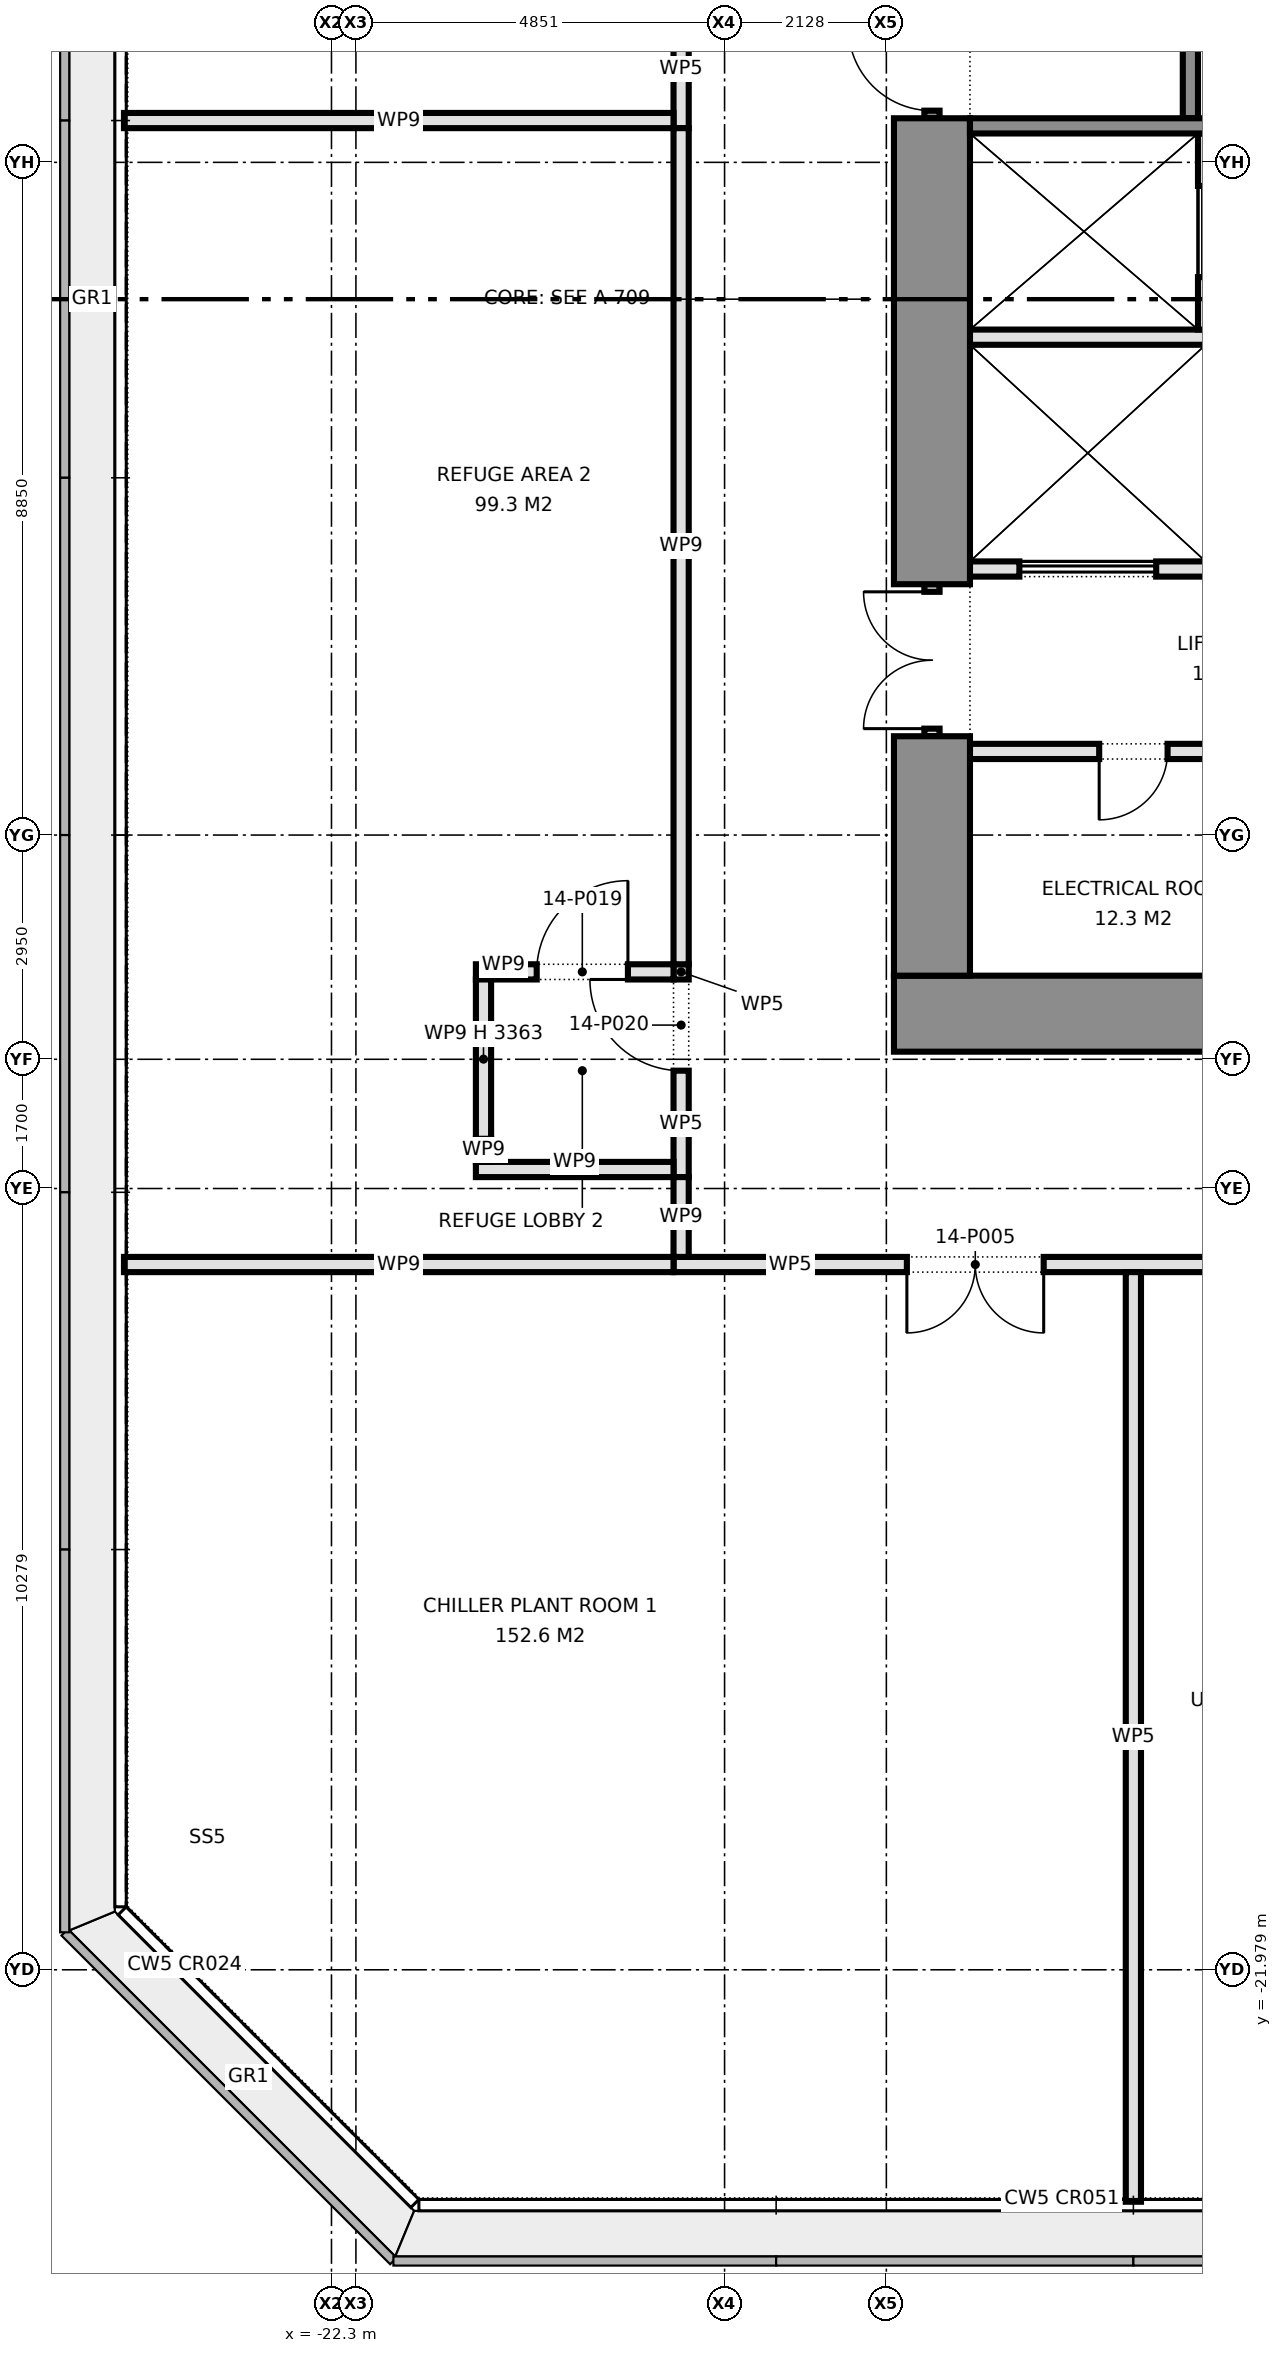
"""IFC4 building model, lengths in metres.
Left out: names, types, materials, properties, quantities, classifications, styles, units other than length and angle.
Written with IfcOpenShell. Run it as: python <this file> out.ifc"""

import sys

from ifc_helpers import new_model, si_unit, direction, frame, frame_2d, origin, place, context, subcontext, project, spatial, rectangle, extrude, element, fill, save


model = new_model("IFC4")
c1 = context("Model", 3, precision=1e-05, world=origin(), true_north=direction((0.0, 1.0)))
c2 = subcontext(c1, "Body", "Model", "MODEL_VIEW")
j1 = project(units=[si_unit("LENGTHUNIT", "METRE"), si_unit("PLANEANGLEUNIT", "RADIAN")], contexts=[c1])
p1 = place(None, origin())
s1 = spatial("IfcSite", under=j1, at=p1, CompositionType="ELEMENT")
p2 = place(p1, origin())
s2 = spatial("IfcBuilding", under=s1, at=p2, CompositionType="ELEMENT")
p3 = place(p2, frame((0.0, 0.0, 64.1)))
s3 = spatial("IfcBuildingStorey", under=s2, at=p3, CompositionType="ELEMENT", Elevation=64.1)
p4 = place(p3, frame((-14.9, -9.4, 0.0), z_axis=(0.0, 0.0, 1.0), x_axis=(1.0, 0.0, 0.0)))
e1 = element("IfcWall", 1, at=p4, inside=s3, PredefinedType="SHEAR", context=c2, shape_type="SweptSolid", body=[
    extrude(rectangle(XDim=10.8, YDim=1.0, at=frame_2d((5.4, 0.0))), origin(), (0.0, 0.0, 1.0), 4.3),
])
p5 = place(p3, frame((-14.4, -8.9, 0.0), z_axis=(0.0, 0.0, 1.0), x_axis=(0.0, 1.0, 0.0)))
e2 = element("IfcWall", 2, at=p5, inside=s3, PredefinedType="SHEAR", context=c2, shape_type="SweptSolid", body=[
    extrude(rectangle(XDim=3.15, YDim=1.0, at=frame_2d((1.575, 0.0))), origin(), (0.0, 0.0, 1.0), 4.3),
])
p6 = place(p3, frame((-14.4, -5.75, 0.0), z_axis=(0.0, 0.0, 1.0), x_axis=(0.0, 1.0, 0.0)))
e3 = element("IfcWall", 3, at=p6, inside=s3, PredefinedType="PARTITIONING", context=c2, shape_type="SweptSolid", body=[
    extrude(rectangle(XDim=2.0, YDim=0.2, at=frame_2d((1.0, 0.0))), origin(), (0.0, 0.0, 1.0), 2.4),
])
p7 = place(p6, frame((0.1, 0.0, 0.0)))
e4 = element("IfcOpeningElement", 4, at=p7, cuts=e3, PredefinedType="OPENING", context=c2, shape_type="SweptSolid", body=[
    extrude(rectangle(XDim=1.8, YDim=2.1, at=frame_2d((0.9, 1.05))), frame((0.0, 0.11, 0.0), z_axis=(0.0, -1.0, 0.0), x_axis=(1.0, 0.0, 0.0)), (0.0, 0.0, 1.0), 0.22),
])
p8 = place(p3, frame((-14.4, -3.75, 0.0), z_axis=(0.0, 0.0, 1.0), x_axis=(0.0, 1.0, 0.0)))
e5 = element("IfcWall", 5, at=p8, inside=s3, PredefinedType="SHEAR", context=c2, shape_type="SweptSolid", body=[
    extrude(rectangle(XDim=6.13, YDim=1.0, at=frame_2d((3.065, 0.0))), origin(), (0.0, 0.0, 1.0), 4.3),
])
p9 = place(p3, frame((-14.4, 2.38, 0.0), z_axis=(0.0, 0.0, 1.0), x_axis=(0.0, 1.0, 0.0)))
e6 = element("IfcWall", 6, at=p9, inside=s3, PredefinedType="SHEAR", context=c2, shape_type="SweptSolid", body=[
    extrude(rectangle(XDim=1.3, YDim=0.2, at=frame_2d((0.65, 0.0))), origin(), (0.0, 0.0, 1.0), 2.4),
])
p10 = place(p9, frame((0.1, 0.0, 0.0)))
e7 = element("IfcOpeningElement", 7, at=p10, cuts=e6, PredefinedType="OPENING", context=c2, shape_type="SweptSolid", body=[
    extrude(rectangle(XDim=1.1, YDim=2.1, at=frame_2d((0.55, 1.05))), frame((0.0, 0.11, 0.0), z_axis=(0.0, -1.0, 0.0), x_axis=(1.0, 0.0, 0.0)), (0.0, 0.0, 1.0), 0.22),
])
p11 = place(p3, frame((-13.9, -5.95, 0.0), z_axis=(0.0, 0.0, 1.0), x_axis=(1.0, 0.0, 0.0)))
e8 = element("IfcWall", 8, at=p11, inside=s3, PredefinedType="PARTITIONING", context=c2, shape_type="SweptSolid", body=[
    extrude(rectangle(XDim=8.8, YDim=0.2, at=frame_2d((4.4, 0.0))), origin(), (0.0, 0.0, 1.0), 4.3),
])
p12 = place(p11, frame((1.7, 0.0, 0.0)))
e9 = element("IfcOpeningElement", 9, at=p12, cuts=e8, PredefinedType="OPENING", context=c2, shape_type="SweptSolid", body=[
    extrude(rectangle(XDim=0.9, YDim=2.1, at=frame_2d((0.45, 1.05))), frame((0.0, 0.11, 0.0), z_axis=(0.0, -1.0, 0.0), x_axis=(1.0, 0.0, 0.0)), (0.0, 0.0, 1.0), 0.22),
])
p13 = place(p3, frame((-13.9, -3.55, 0.0), z_axis=(0.0, 0.0, 1.0), x_axis=(1.0, 0.0, 0.0)))
e10 = element("IfcWall", 10, at=p13, inside=s3, PredefinedType="PARTITIONING", context=c2, shape_type="SweptSolid", body=[
    extrude(rectangle(XDim=8.8, YDim=0.2, at=frame_2d((4.4, 0.0))), origin(), (0.0, 0.0, 1.0), 4.3),
])
p14 = place(p13, frame((0.65, 0.0, 0.0)))
e11 = element("IfcOpeningElement", 11, at=p14, cuts=e10, PredefinedType="OPENING", context=c2, shape_type="SweptSolid", body=[
    extrude(rectangle(XDim=1.8, YDim=2.1, at=frame_2d((0.9, 1.05))), frame((0.0, 0.11, 0.0), z_axis=(0.0, -1.0, 0.0), x_axis=(1.0, 0.0, 0.0)), (0.0, 0.0, 1.0), 0.22),
])
p15 = place(p13, frame((4.0, 0.0, 0.0)))
e12 = element("IfcOpeningElement", 12, at=p15, cuts=e10, PredefinedType="OPENING", context=c2, shape_type="SweptSolid", body=[
    extrude(rectangle(XDim=1.2, YDim=2.1, at=frame_2d((0.6, 1.05))), frame((0.0, 0.11, 0.0), z_axis=(0.0, -1.0, 0.0), x_axis=(1.0, 0.0, 0.0)), (0.0, 0.0, 1.0), 0.22),
])
p16 = place(p13, frame((6.85, 0.0, 0.0)))
e13 = element("IfcOpeningElement", 13, at=p16, cuts=e10, PredefinedType="OPENING", context=c2, shape_type="SweptSolid", body=[
    extrude(rectangle(XDim=1.2, YDim=2.1, at=frame_2d((0.6, 1.05))), frame((0.0, 0.11, 0.0), z_axis=(0.0, -1.0, 0.0), x_axis=(1.0, 0.0, 0.0)), (0.0, 0.0, 1.0), 0.22),
])
p17 = place(p3, frame((-13.9, -0.5, 0.0), z_axis=(0.0, 0.0, 1.0), x_axis=(1.0, 0.0, 0.0)))
e14 = element("IfcWall", 14, at=p17, inside=s3, PredefinedType="PARTITIONING", context=c2, shape_type="SweptSolid", body=[
    extrude(rectangle(XDim=8.8, YDim=0.2, at=frame_2d((4.4, 0.0))), origin(), (0.0, 0.0, 1.0), 4.3),
])
p18 = place(p3, frame((-10.8, -0.4, 0.0), z_axis=(0.0, 0.0, 1.0), x_axis=(0.0, 1.0, 0.0)))
e15 = element("IfcWall", 15, at=p18, inside=s3, PredefinedType="PARTITIONING", context=c2, shape_type="SweptSolid", body=[
    extrude(rectangle(XDim=2.58, YDim=0.2, at=frame_2d((1.29, 0.0))), origin(), (0.0, 0.0, 1.0), 4.3),
])
p19 = place(p18, frame((0.69, 0.0, 0.0)))
e16 = element("IfcOpeningElement", 16, at=p19, cuts=e15, PredefinedType="OPENING", context=c2, shape_type="SweptSolid", body=[
    extrude(rectangle(XDim=1.2, YDim=2.1, at=frame_2d((0.6, 1.05))), frame((0.0, 0.11, 0.0), z_axis=(0.0, -1.0, 0.0), x_axis=(1.0, 0.0, 0.0)), (0.0, 0.0, 1.0), 0.22),
])
p20 = place(p3, frame((-13.9, 2.28, 0.0), z_axis=(0.0, 0.0, 1.0), x_axis=(1.0, 0.0, 0.0)))
e17 = element("IfcWall", 17, at=p20, inside=s3, PredefinedType="SHEAR", context=c2, shape_type="SweptSolid", body=[
    extrude(rectangle(XDim=8.8, YDim=0.2, at=frame_2d((4.4, 0.0))), origin(), (0.0, 0.0, 1.0), 4.3),
])
p21 = place(p20, frame((3.8, 0.0, 0.0)))
e18 = element("IfcOpeningElement", 18, at=p21, cuts=e17, PredefinedType="OPENING", context=c2, shape_type="SweptSolid", body=[
    extrude(rectangle(XDim=1.2, YDim=2.1, at=frame_2d((0.6, 1.05))), frame((0.0, 0.11, 0.0), z_axis=(0.0, -1.0, 0.0), x_axis=(1.0, 0.0, 0.0)), (0.0, 0.0, 1.0), 0.22),
])
p22 = place(p20, frame((6.8, 0.0, 0.0)))
e19 = element("IfcOpeningElement", 19, at=p22, cuts=e17, PredefinedType="OPENING", context=c2, shape_type="SweptSolid", body=[
    extrude(rectangle(XDim=1.2, YDim=2.1, at=frame_2d((0.6, 1.05))), frame((0.0, 0.11, 0.0), z_axis=(0.0, -1.0, 0.0), x_axis=(1.0, 0.0, 0.0)), (0.0, 0.0, 1.0), 0.22),
])
p23 = place(p3, frame((-11.0, 2.38, 0.0), z_axis=(0.0, 0.0, 1.0), x_axis=(0.0, 1.0, 0.0)))
e20 = element("IfcWall", 20, at=p23, inside=s3, PredefinedType="SHEAR", context=c2, shape_type="SweptSolid", body=[
    extrude(rectangle(XDim=6.52, YDim=0.2, at=frame_2d((3.26, 0.0))), origin(), (0.0, 0.0, 1.0), 4.3),
])
p24 = place(p3, frame((-17.8, -12.7, 0.0), z_axis=(0.0, 0.0, 1.0), x_axis=(1.0, 0.0, 0.0)))
e21 = element("IfcWall", 21, at=p24, inside=s3, PredefinedType="PARTITIONING", context=c2, shape_type="SweptSolid", body=[
    extrude(rectangle(XDim=22.85, YDim=0.2, at=frame_2d((11.425, 0.0))), origin(), (0.0, 0.0, 1.0), 4.3),
])
p25 = place(p24, frame((3.07, 0.0, 0.0)))
e22 = element("IfcOpeningElement", 22, at=p25, cuts=e21, PredefinedType="OPENING", context=c2, shape_type="SweptSolid", body=[
    extrude(rectangle(XDim=1.8, YDim=2.1, at=frame_2d((0.9, 1.05))), frame((0.0, 0.11, 0.0), z_axis=(0.0, -1.0, 0.0), x_axis=(1.0, 0.0, 0.0)), (0.0, 0.0, 1.0), 0.22),
])
p26 = place(p24, frame((7.5, 0.0, 0.0)))
e23 = element("IfcOpeningElement", 23, at=p26, cuts=e21, PredefinedType="OPENING", context=c2, shape_type="SweptSolid", body=[
    extrude(rectangle(XDim=1.8, YDim=2.1, at=frame_2d((0.9, 1.05))), frame((0.0, 0.11, 0.0), z_axis=(0.0, -1.0, 0.0), x_axis=(1.0, 0.0, 0.0)), (0.0, 0.0, 1.0), 0.22),
])
p27 = place(p24, frame((14.55, 0.0, 0.0)))
e24 = element("IfcOpeningElement", 24, at=p27, cuts=e21, PredefinedType="OPENING", context=c2, shape_type="SweptSolid", body=[
    extrude(rectangle(XDim=1.8, YDim=2.1, at=frame_2d((0.9, 1.05))), frame((0.0, 0.11, 0.0), z_axis=(0.0, -1.0, 0.0), x_axis=(1.0, 0.0, 0.0)), (0.0, 0.0, 1.0), 0.22),
])
p28 = place(p24, frame((20.85, 0.0, 0.0)))
e25 = element("IfcOpeningElement", 25, at=p28, cuts=e21, PredefinedType="OPENING", context=c2, shape_type="SweptSolid", body=[
    extrude(rectangle(XDim=1.2, YDim=2.1, at=frame_2d((0.6, 1.05))), frame((0.0, 0.11, 0.0), z_axis=(0.0, -1.0, 0.0), x_axis=(1.0, 0.0, 0.0)), (0.0, 0.0, 1.0), 0.22),
])
p29 = place(p3, frame((-11.75, -25.03, 0.0), z_axis=(0.0, 0.0, 1.0), x_axis=(0.0, 1.0, 0.0)))
e26 = element("IfcWall", 26, at=p29, inside=s3, PredefinedType="PARTITIONING", context=c2, shape_type="SweptSolid", body=[
    extrude(rectangle(XDim=12.23, YDim=0.2, at=frame_2d((6.115, 0.0))), origin(), (0.0, 0.0, 1.0), 4.3),
])
p30 = place(p3, frame((-17.7, -11.55, 0.0), z_axis=(0.0, 0.0, 1.0), x_axis=(0.0, 1.0, 0.0)))
e27 = element("IfcWall", 27, at=p30, inside=s3, PredefinedType="PARTITIONING", context=c2, shape_type="SweptSolid", body=[
    extrude(rectangle(XDim=2.8, YDim=0.2, at=frame_2d((1.4, 0.0))), origin(), (0.0, 0.0, 1.0), 4.3),
])
p31 = place(p30, frame((1.4, 0.0, 0.0)))
e28 = element("IfcOpeningElement", 28, at=p31, cuts=e27, PredefinedType="OPENING", context=c2, shape_type="SweptSolid", body=[
    extrude(rectangle(XDim=1.2, YDim=2.1, at=frame_2d((0.6, 1.05))), frame((0.0, 0.11, 0.0), z_axis=(0.0, -1.0, 0.0), x_axis=(1.0, 0.0, 0.0)), (0.0, 0.0, 1.0), 0.22),
])
p32 = place(p3, frame((-17.7, 2.25, 0.0), z_axis=(0.0, 0.0, 1.0), x_axis=(0.0, 1.0, 0.0)))
e29 = element("IfcWall", 29, at=p32, inside=s3, PredefinedType="PARTITIONING", context=c2, shape_type="SweptSolid", body=[
    extrude(rectangle(XDim=10.35, YDim=0.2, at=frame_2d((5.175, 0.0))), origin(), (0.0, 0.0, 1.0), 4.3),
])
p33 = place(p32, frame((1.55, 0.0, 0.0)))
e30 = element("IfcOpeningElement", 30, at=p33, cuts=e29, PredefinedType="OPENING", context=c2, shape_type="SweptSolid", body=[
    extrude(rectangle(XDim=1.8, YDim=2.1, at=frame_2d((0.9, 1.05))), frame((0.0, 0.11, 0.0), z_axis=(0.0, -1.0, 0.0), x_axis=(1.0, 0.0, 0.0)), (0.0, 0.0, 1.0), 0.22),
])
p34 = place(p32, frame((5.675, 0.0, 0.0)))
e31 = element("IfcOpeningElement", 31, at=p34, cuts=e29, PredefinedType="OPENING", context=c2, shape_type="SweptSolid", body=[
    extrude(rectangle(XDim=1.8, YDim=2.1, at=frame_2d((0.9, 1.05))), frame((0.0, 0.11, 0.0), z_axis=(0.0, -1.0, 0.0), x_axis=(1.0, 0.0, 0.0)), (0.0, 0.0, 1.0), 0.22),
])
p35 = place(p3, frame((-25.03, -12.7, 0.0), z_axis=(0.0, 0.0, 1.0), x_axis=(1.0, 0.0, 0.0)))
e32 = element("IfcWall", 32, at=p35, inside=s3, PredefinedType="PARTITIONING", context=c2, shape_type="SweptSolid", body=[
    extrude(rectangle(XDim=7.23, YDim=0.2, at=frame_2d((3.615, 0.0))), origin(), (0.0, 0.0, 1.0), 4.3),
])
p36 = place(p3, frame((-20.4, -11.45, 0.0), z_axis=(0.0, 0.0, 1.0), x_axis=(1.0, 0.0, 0.0)))
e33 = element("IfcWall", 33, at=p36, inside=s3, PredefinedType="PARTITIONING", context=c2, shape_type="SweptSolid", body=[
    extrude(rectangle(XDim=2.6, YDim=0.2, at=frame_2d((1.3, 0.0))), origin(), (0.0, 0.0, 1.0), 4.3),
])
p37 = place(p3, frame((-20.4, -8.85, 0.0), z_axis=(0.0, 0.0, 1.0), x_axis=(1.0, 0.0, 0.0)))
e34 = element("IfcWall", 34, at=p37, inside=s3, PredefinedType="PARTITIONING", context=c2, shape_type="SweptSolid", body=[
    extrude(rectangle(XDim=2.6, YDim=0.2, at=frame_2d((1.3, 0.0))), origin(), (0.0, 0.0, 1.0), 4.3),
])
p38 = place(p37, frame((0.8, 0.0, 0.0)))
e35 = element("IfcOpeningElement", 35, at=p38, cuts=e34, PredefinedType="OPENING", context=c2, shape_type="SweptSolid", body=[
    extrude(rectangle(XDim=1.2, YDim=2.1, at=frame_2d((0.6, 1.05))), frame((0.0, 0.11, 0.0), z_axis=(0.0, -1.0, 0.0), x_axis=(1.0, 0.0, 0.0)), (0.0, 0.0, 1.0), 0.22),
])
p39 = place(p3, frame((-25.03, 2.35, 0.0), z_axis=(0.0, 0.0, 1.0), x_axis=(1.0, 0.0, 0.0)))
e36 = element("IfcWall", 36, at=p39, inside=s3, PredefinedType="PARTITIONING", context=c2, shape_type="SweptSolid", body=[
    extrude(rectangle(XDim=7.23, YDim=0.2, at=frame_2d((3.615, 0.0))), origin(), (0.0, 0.0, 1.0), 4.3),
])
p40 = place(p3, frame((-17.7, -12.6, 0.0), z_axis=(0.0, 0.0, 1.0), x_axis=(0.0, 1.0, 0.0)))
e37 = element("IfcWall", 37, at=p40, inside=s3, PredefinedType="PARTITIONING", context=c2, shape_type="SweptSolid", body=[
    extrude(rectangle(XDim=1.05, YDim=0.2, at=frame_2d((0.525, 0.0))), origin(), (0.0, 0.0, 1.0), 4.3),
])
p41 = place(p3, frame((-17.7, -8.75, 0.0), z_axis=(0.0, 0.0, 1.0), x_axis=(0.0, 1.0, 0.0)))
e38 = element("IfcWall", 38, at=p41, inside=s3, PredefinedType="PARTITIONING", context=c2, shape_type="SweptSolid", body=[
    extrude(rectangle(XDim=11.0, YDim=0.2, at=frame_2d((5.5, 0.0))), origin(), (0.0, 0.0, 1.0), 4.3),
])
p42 = place(p3, frame((-20.3, -11.35, 0.0), z_axis=(0.0, 0.0, 1.0), x_axis=(0.0, 1.0, 0.0)))
e39 = element("IfcWall", 39, at=p42, inside=s3, PredefinedType="PARTITIONING", context=c2, shape_type="SweptSolid", body=[
    extrude(rectangle(XDim=0.304, YDim=0.2, at=frame_2d((0.152, 0.0))), origin(), (0.0, 0.0, 1.0), 4.3),
])
p43 = place(p3, frame((-20.3, -11.046, 0.0), z_axis=(0.0, 0.0, 1.0), x_axis=(0.0, 1.0, 0.0)))
e40 = element("IfcWall", 40, at=p43, inside=s3, PredefinedType="PARTITIONING", context=c2, shape_type="SweptSolid", body=[
    extrude(rectangle(XDim=2.096, YDim=0.2, at=frame_2d((1.048, 0.0))), origin(), (0.0, 0.0, 1.0), 3.363),
])
p44 = place(p7, origin())
e41 = element("IfcDoor", 41, at=p44, inside=s3, OperationType="DOUBLE_DOOR_SINGLE_SWING", PredefinedType="DOOR", context=c2, shape_type="SweptSolid", body=[
    extrude(rectangle(XDim=1.8, YDim=2.1, at=frame_2d((0.9, 1.05))), frame((0.0, 0.025, 0.0), z_axis=(0.0, -1.0, 0.0), x_axis=(1.0, 0.0, 0.0)), (0.0, 0.0, 1.0), 0.05),
])
fill(e4, e41)
p45 = place(p10, origin())
e42 = element("IfcDoor", 42, at=p45, inside=s3, OperationType="SINGLE_SWING_RIGHT", PredefinedType="DOOR", context=c2, shape_type="SweptSolid", body=[
    extrude(rectangle(XDim=1.1, YDim=2.1, at=frame_2d((0.55, 1.05))), frame((0.0, 0.025, 0.0), z_axis=(0.0, -1.0, 0.0), x_axis=(1.0, 0.0, 0.0)), (0.0, 0.0, 1.0), 0.05),
])
fill(e7, e42)
p46 = place(p14, origin())
e43 = element("IfcDoor", 43, at=p46, inside=s3, OperationType="DOUBLE_DOOR_SLIDING", PredefinedType="DOOR", context=c2, shape_type="SweptSolid", body=[
    extrude(rectangle(XDim=1.8, YDim=2.1, at=frame_2d((0.9, 1.05))), frame((0.0, 0.025, 0.0), z_axis=(0.0, -1.0, 0.0), x_axis=(1.0, 0.0, 0.0)), (0.0, 0.0, 1.0), 0.05),
])
fill(e11, e43)
p47 = place(p12, frame((0.9, 0.0, 0.0), z_axis=(0.0, 0.0, 1.0), x_axis=(-1.0, 0.0, 0.0)))
e44 = element("IfcDoor", 44, at=p47, inside=s3, OperationType="SINGLE_SWING_RIGHT", PredefinedType="DOOR", context=c2, shape_type="SweptSolid", body=[
    extrude(rectangle(XDim=0.9, YDim=2.1, at=frame_2d((0.45, 1.05))), frame((0.0, 0.025, 0.0), z_axis=(0.0, -1.0, 0.0), x_axis=(1.0, 0.0, 0.0)), (0.0, 0.0, 1.0), 0.05),
])
fill(e9, e44)
p48 = place(p25, frame((1.8, 0.0, 0.0), z_axis=(0.0, 0.0, 1.0), x_axis=(-1.0, 0.0, 0.0)))
e45 = element("IfcDoor", 45, at=p48, inside=s3, OperationType="DOUBLE_DOOR_SINGLE_SWING", PredefinedType="DOOR", context=c2, shape_type="SweptSolid", body=[
    extrude(rectangle(XDim=1.8, YDim=2.1, at=frame_2d((0.9, 1.05))), frame((0.0, 0.025, 0.0), z_axis=(0.0, -1.0, 0.0), x_axis=(1.0, 0.0, 0.0)), (0.0, 0.0, 1.0), 0.05),
])
fill(e22, e45)
p49 = place(p38, origin())
e46 = element("IfcDoor", 46, at=p49, inside=s3, OperationType="SINGLE_SWING_RIGHT", PredefinedType="DOOR", context=c2, shape_type="SweptSolid", body=[
    extrude(rectangle(XDim=1.2, YDim=2.1, at=frame_2d((0.6, 1.05))), frame((0.0, 0.025, 0.0), z_axis=(0.0, -1.0, 0.0), x_axis=(1.0, 0.0, 0.0)), (0.0, 0.0, 1.0), 0.05),
])
fill(e35, e46)
p50 = place(p31, origin())
e47 = element("IfcDoor", 47, at=p50, inside=s3, OperationType="SINGLE_SWING_RIGHT", PredefinedType="DOOR", context=c2, shape_type="SweptSolid", body=[
    extrude(rectangle(XDim=1.2, YDim=2.1, at=frame_2d((0.6, 1.05))), frame((0.0, 0.025, 0.0), z_axis=(0.0, -1.0, 0.0), x_axis=(1.0, 0.0, 0.0)), (0.0, 0.0, 1.0), 0.05),
])
fill(e28, e47)
save(model, sys.argv[1])
